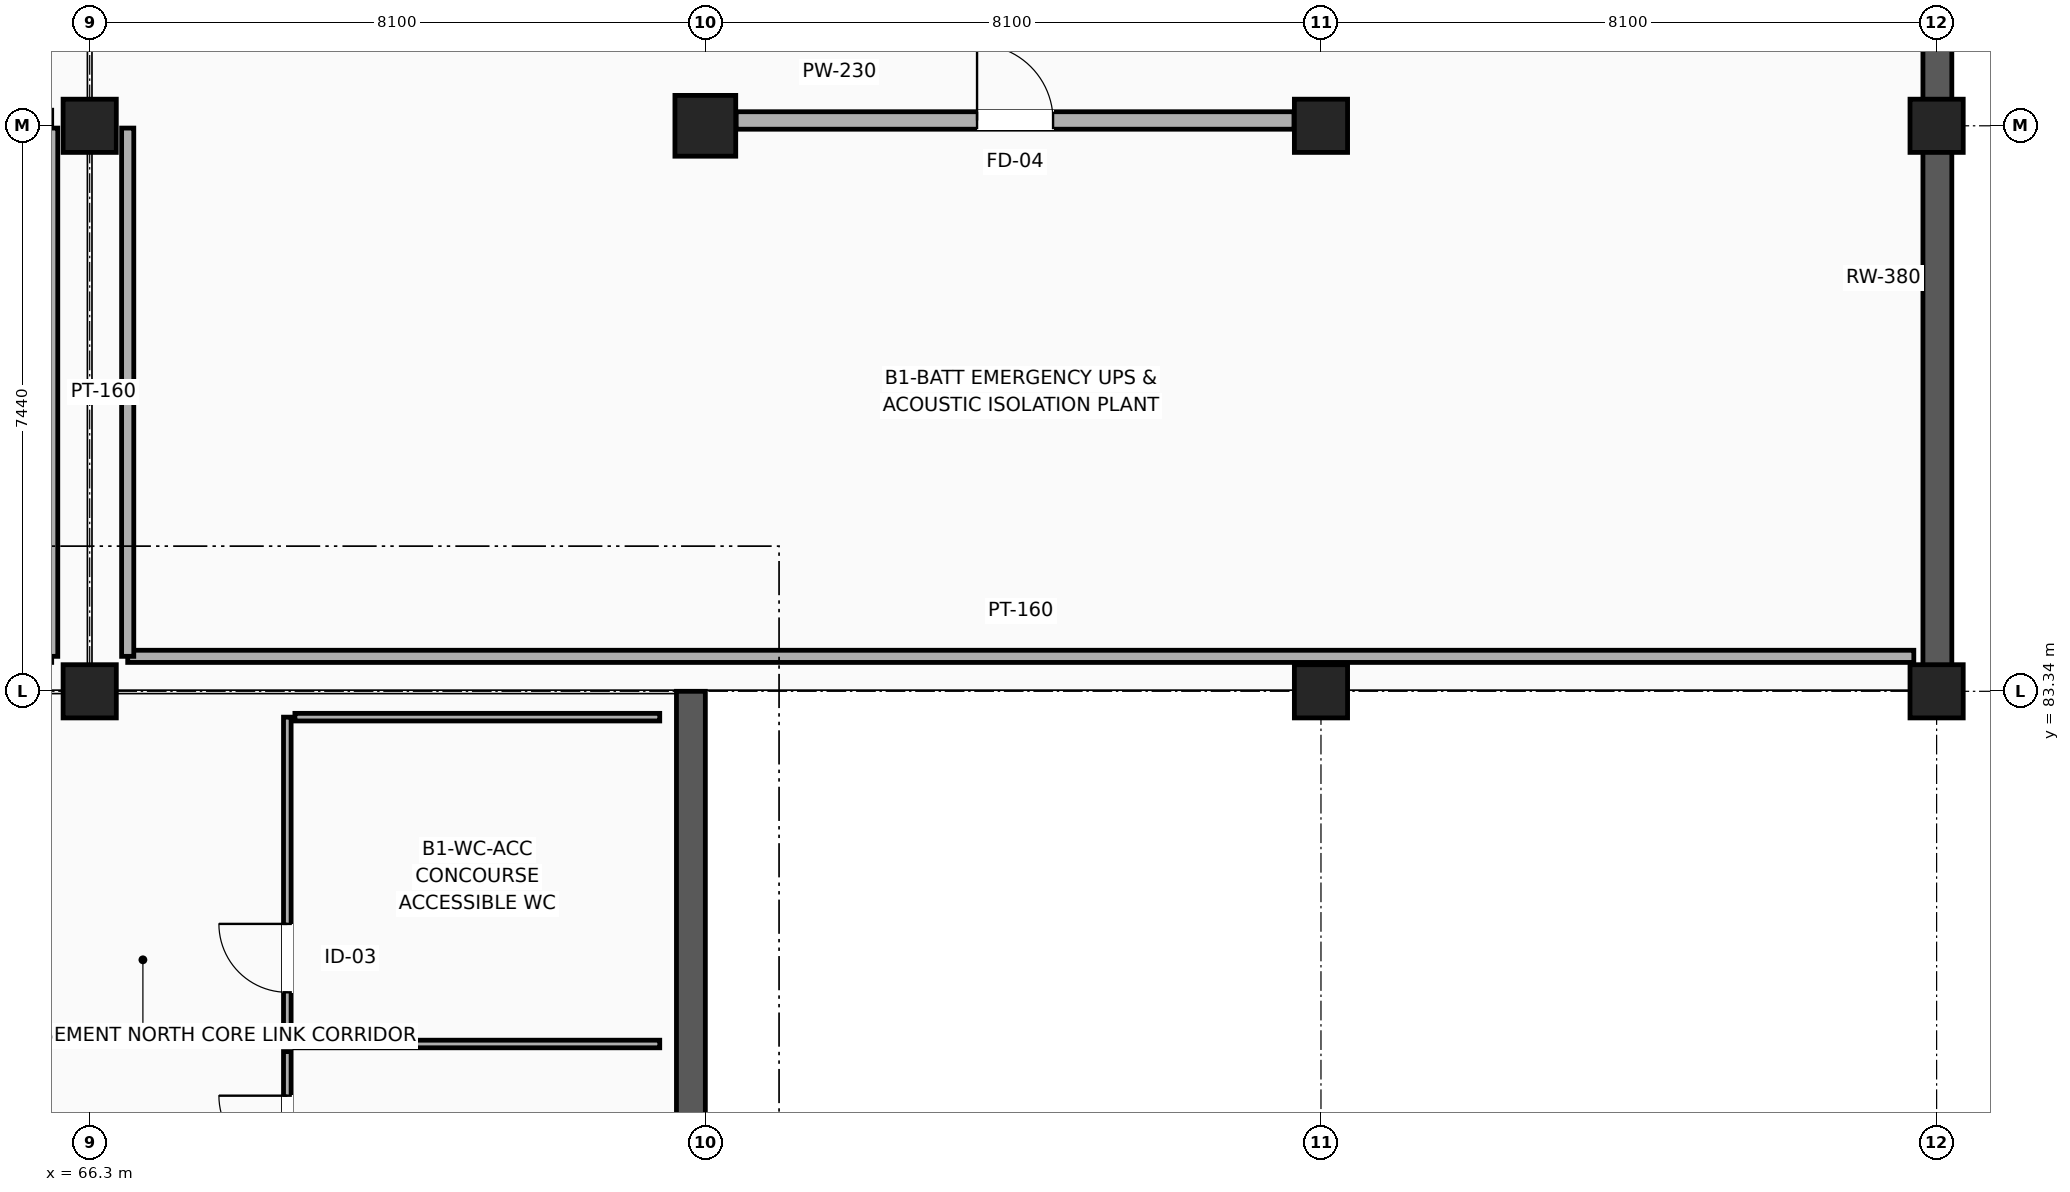
"""IFC4 building model, lengths in metres.
Left out: names, types, materials, properties, quantities, classifications, styles, units other than length and angle.
Written with IfcOpenShell. Run it as: python <this file> out.ifc"""

import sys

from ifc_helpers import new_model, si_unit, direction, frame, frame_2d, origin, origin_2d, place, context, subcontext, project, spatial, rectangle, extrude, element, fill, save


model = new_model("IFC4")
c1 = context("Model", 3, precision=1e-05, world=origin(), true_north=direction((0.0, 1.0)))
c2 = subcontext(c1, "Body", "Model", "MODEL_VIEW")
j1 = project(units=[si_unit("LENGTHUNIT", "METRE"), si_unit("PLANEANGLEUNIT", "RADIAN")], contexts=[c1])
p1 = place(None, origin())
s1 = spatial("IfcSite", under=j1, at=p1, CompositionType="ELEMENT")
p2 = place(p1, origin())
s2 = spatial("IfcBuilding", under=s1, at=p2, CompositionType="ELEMENT")
p3 = place(p2, frame((0.0, 0.0, -4.8)))
s3 = spatial("IfcBuildingStorey", under=s2, at=p3, CompositionType="ELEMENT", Elevation=-4.8)
for number, where, z_axis, x_axis in (
    (1, (66.3, 83.34, 0.0), (0.0, 0.0, 1.0), (1.0, 0.0, 0.0)),
    (2, (66.3, 90.78, 0.0), (0.0, 0.0, 1.0), (1.0, 0.0, 0.0)),
):
    element("IfcColumn", number, at=place(p3, frame(where, z_axis=z_axis, x_axis=x_axis)), inside=s3, PredefinedType="COLUMN", context=c2, shape_type="SweptSolid", body=[
        extrude(rectangle(XDim=0.7, YDim=0.7, at=origin_2d()), origin(), (0.0, 0.0, 1.0), 4.8),
    ])
p4 = place(p3, frame((74.4, 90.78, 0.0), z_axis=(0.0, 0.0, 1.0), x_axis=(1.0, 0.0, 0.0)))
e3 = element("IfcColumn", 3, at=p4, inside=s3, PredefinedType="COLUMN", context=c2, shape_type="SweptSolid", body=[
    extrude(rectangle(XDim=0.8, YDim=0.8, at=origin_2d()), origin(), (0.0, 0.0, 1.0), 4.8),
])
for number, where, z_axis, x_axis in (
    (4, (82.5, 83.34, 0.0), (0.0, 0.0, 1.0), (1.0, 0.0, 0.0)),
    (5, (82.5, 90.78, 0.0), (0.0, 0.0, 1.0), (1.0, 0.0, 0.0)),
    (6, (90.6, 83.34, 0.0), (0.0, 0.0, 1.0), (1.0, 0.0, 0.0)),
    (7, (90.6, 90.78, 0.0), (0.0, 0.0, 1.0), (1.0, 0.0, 0.0)),
):
    element("IfcColumn", number, at=place(p3, frame(where, z_axis=z_axis, x_axis=x_axis)), inside=s3, PredefinedType="COLUMN", context=c2, shape_type="SweptSolid", body=[
        extrude(rectangle(XDim=0.7, YDim=0.7, at=origin_2d()), origin(), (0.0, 0.0, 1.0), 4.8),
    ])
p5 = place(p3, frame((74.21, 72.73, 0.0), z_axis=(0.0, 0.0, 1.0), x_axis=(0.0, 1.0, 0.0)))
e8 = element("IfcWall", 8, at=p5, inside=s3, PredefinedType="USERDEFINED", context=c2, shape_type="SweptSolid", body=[
    extrude(rectangle(XDim=10.61, YDim=0.38, at=frame_2d((5.305, 0.0))), origin(), (0.0, 0.0, 1.0), 4.48),
])
p6 = place(p3, frame((90.61, 83.34, 0.0), z_axis=(0.0, 0.0, 1.0), x_axis=(0.0, 1.0, 0.0)))
e9 = element("IfcWall", 9, at=p6, inside=s3, PredefinedType="USERDEFINED", context=c2, shape_type="SweptSolid", body=[
    extrude(rectangle(XDim=10.88, YDim=0.38, at=frame_2d((5.44, 0.0))), origin(), (0.0, 0.0, 1.0), 4.48),
])
p7 = place(p3, frame((68.9, 73.0, 0.0), z_axis=(0.0, 0.0, 1.0), x_axis=(0.0, 1.0, 0.0)))
e10 = element("IfcWall", 10, at=p7, inside=s3, PredefinedType="PARTITIONING", context=c2, shape_type="SweptSolid", body=[
    extrude(rectangle(XDim=5.6, YDim=0.1, at=frame_2d((2.8, 0.0))), origin(), (0.0, 0.0, 1.0), 3.182),
])
p8 = place(p7, frame((4.12, 0.0, 0.0)))
e11 = element("IfcOpeningElement", 11, at=p8, cuts=e10, PredefinedType="OPENING", context=c2, shape_type="SweptSolid", body=[
    extrude(rectangle(XDim=0.9, YDim=2.1, at=frame_2d((0.45, 1.05))), frame((0.0, 0.06, 0.0), z_axis=(0.0, -1.0, 0.0), x_axis=(1.0, 0.0, 0.0)), (0.0, 0.0, 1.0), 0.12),
])
p9 = place(p3, frame((68.9, 78.8, 0.0), z_axis=(0.0, 0.0, 1.0), x_axis=(0.0, 1.0, 0.0)))
e12 = element("IfcWall", 12, at=p9, inside=s3, PredefinedType="PARTITIONING", context=c2, shape_type="SweptSolid", body=[
    extrude(rectangle(XDim=4.2, YDim=0.1, at=frame_2d((2.1, 0.0))), origin(), (0.0, 0.0, 1.0), 3.182),
])
p10 = place(p9, frame((0.58, 0.0, 0.0)))
e13 = element("IfcOpeningElement", 13, at=p10, cuts=e12, PredefinedType="OPENING", context=c2, shape_type="SweptSolid", body=[
    extrude(rectangle(XDim=0.9, YDim=2.1, at=frame_2d((0.45, 1.05))), frame((0.0, 0.06, 0.0), z_axis=(0.0, -1.0, 0.0), x_axis=(1.0, 0.0, 0.0)), (0.0, 0.0, 1.0), 0.12),
])
p11 = place(p3, frame((69.0, 78.7, 0.0), z_axis=(0.0, 0.0, 1.0), x_axis=(1.0, 0.0, 0.0)))
e14 = element("IfcWall", 14, at=p11, inside=s3, PredefinedType="PARTITIONING", context=c2, shape_type="SweptSolid", body=[
    extrude(rectangle(XDim=4.8, YDim=0.1, at=frame_2d((2.4, 0.0))), origin(), (0.0, 0.0, 1.0), 4.46),
])
p12 = place(p3, frame((74.805, 90.85, 0.0), z_axis=(0.0, 0.0, 1.0), x_axis=(1.0, 0.0, 0.0)))
e15 = element("IfcWall", 15, at=p12, inside=s3, PredefinedType="SOLIDWALL", context=c2, shape_type="SweptSolid", body=[
    extrude(rectangle(XDim=7.34, YDim=0.23, at=frame_2d((3.67, 0.0))), origin(), (0.0, 0.0, 1.0), 3.512),
])
p13 = place(p12, frame((3.17, 0.0, 0.0)))
e16 = element("IfcOpeningElement", 16, at=p13, cuts=e15, PredefinedType="OPENING", context=c2, shape_type="SweptSolid", body=[
    extrude(rectangle(XDim=1.0, YDim=2.15, at=frame_2d((0.5, 1.075))), frame((0.0, 0.125, 0.0), z_axis=(0.0, -1.0, 0.0), x_axis=(1.0, 0.0, 0.0)), (0.0, 0.0, 1.0), 0.25),
])
p14 = place(p3, frame((69.0, 83.0, 0.0), z_axis=(0.0, 0.0, 1.0), x_axis=(1.0, 0.0, 0.0)))
e17 = element("IfcWall", 17, at=p14, inside=s3, PredefinedType="PARTITIONING", context=c2, shape_type="SweptSolid", body=[
    extrude(rectangle(XDim=4.8, YDim=0.1, at=frame_2d((2.4, 0.0))), origin(), (0.0, 0.0, 1.0), 3.182),
])
p15 = place(p3, frame((46.4, 83.8, 0.0), z_axis=(0.0, 0.0, 1.0), x_axis=(1.0, 0.0, 0.0)))
e18 = element("IfcWall", 18, at=p15, inside=s3, PredefinedType="PARTITIONING", context=c2, shape_type="SweptSolid", body=[
    extrude(rectangle(XDim=19.4, YDim=0.16, at=frame_2d((9.7, 0.0))), origin(), (0.0, 0.0, 1.0), 3.712),
])
p16 = place(p3, frame((65.8, 83.8, 0.0), z_axis=(0.0, 0.0, 1.0), x_axis=(0.0, 1.0, 0.0)))
e19 = element("IfcWall", 19, at=p16, inside=s3, PredefinedType="PARTITIONING", context=c2, shape_type="SweptSolid", body=[
    extrude(rectangle(XDim=6.95, YDim=0.16, at=frame_2d((3.475, 0.0))), origin(), (0.0, 0.0, 1.0), 3.512),
])
p17 = place(p3, frame((66.8, 83.8, 0.0), z_axis=(0.0, 0.0, 1.0), x_axis=(1.0, 0.0, 0.0)))
e20 = element("IfcWall", 20, at=p17, inside=s3, PredefinedType="PARTITIONING", context=c2, shape_type="SweptSolid", body=[
    extrude(rectangle(XDim=23.5, YDim=0.16, at=frame_2d((11.75, 0.0))), origin(), (0.0, 0.0, 1.0), 3.182),
])
p18 = place(p3, frame((66.8, 83.8, 0.0), z_axis=(0.0, 0.0, 1.0), x_axis=(0.0, 1.0, 0.0)))
e21 = element("IfcWall", 21, at=p18, inside=s3, PredefinedType="PARTITIONING", context=c2, shape_type="SweptSolid", body=[
    extrude(rectangle(XDim=6.95, YDim=0.16, at=frame_2d((3.475, 0.0))), origin(), (0.0, 0.0, 1.0), 3.182),
])
p19 = place(p8, origin())
e22 = element("IfcDoor", 22, at=p19, inside=s3, OperationType="SINGLE_SWING_RIGHT", PredefinedType="DOOR", context=c2, shape_type="SweptSolid", body=[
    extrude(rectangle(XDim=0.9, YDim=2.1, at=frame_2d((0.45, 1.05))), frame((0.0, 0.025, 0.0), z_axis=(0.0, -1.0, 0.0), x_axis=(1.0, 0.0, 0.0)), (0.0, 0.0, 1.0), 0.05),
])
fill(e11, e22)
p20 = place(p10, origin())
e23 = element("IfcDoor", 23, at=p20, inside=s3, OperationType="SINGLE_SWING_RIGHT", PredefinedType="DOOR", context=c2, shape_type="SweptSolid", body=[
    extrude(rectangle(XDim=0.9, YDim=2.1, at=frame_2d((0.45, 1.05))), frame((0.0, 0.025, 0.0), z_axis=(0.0, -1.0, 0.0), x_axis=(1.0, 0.0, 0.0)), (0.0, 0.0, 1.0), 0.05),
])
fill(e13, e23)
p21 = place(p13, origin())
e24 = element("IfcDoor", 24, at=p21, inside=s3, OperationType="SINGLE_SWING_LEFT", PredefinedType="DOOR", context=c2, shape_type="SweptSolid", body=[
    extrude(rectangle(XDim=1.0, YDim=2.15, at=frame_2d((0.5, 1.075))), frame((0.0, 0.025, 0.0), z_axis=(0.0, -1.0, 0.0), x_axis=(1.0, 0.0, 0.0)), (0.0, 0.0, 1.0), 0.05),
])
fill(e16, e24)
save(model, sys.argv[1])
